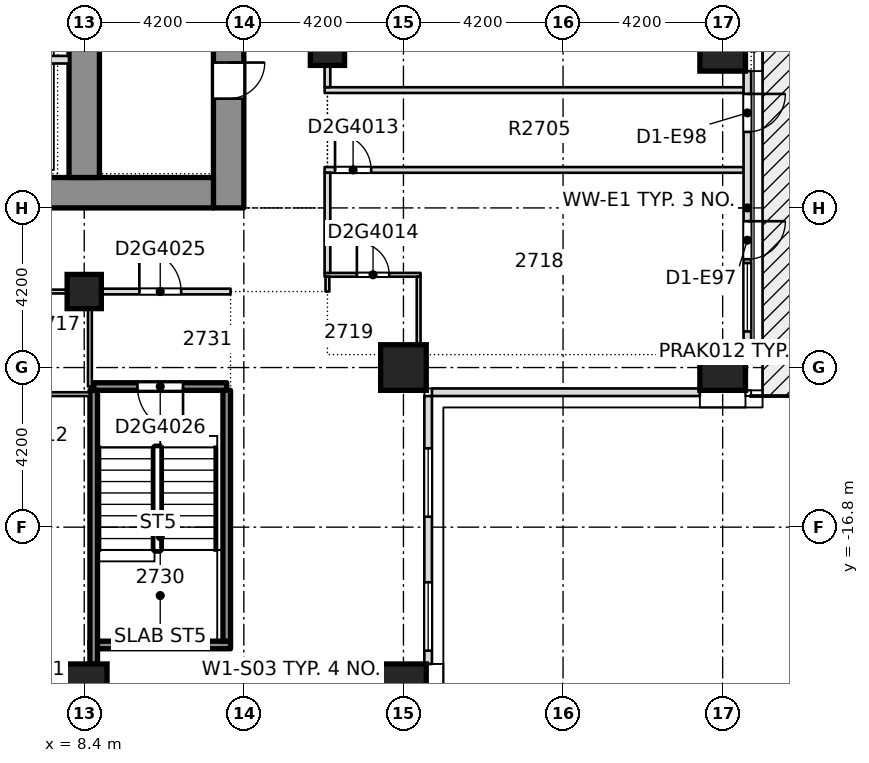
"""IFC4 building model, lengths in metres.
Left out: names, types, materials, properties, quantities, classifications, styles, units other than length and angle.
Written with IfcOpenShell. Run it as: python <this file> out.ifc"""

import sys

from ifc_helpers import new_model, si_unit, direction, frame, frame_2d, origin, origin_2d, place, context, subcontext, project, spatial, rectangle, extrude, element, fill, save


model = new_model("IFC4")
c1 = context("Model", 3, precision=1e-05, world=origin(), true_north=direction((0.0, 1.0)))
c2 = subcontext(c1, "Body", "Model", "MODEL_VIEW")
j1 = project(units=[si_unit("LENGTHUNIT", "METRE"), si_unit("PLANEANGLEUNIT", "RADIAN")], contexts=[c1])
p1 = place(None, origin())
s1 = spatial("IfcSite", under=j1, at=p1, CompositionType="ELEMENT")
p2 = place(p1, origin())
s2 = spatial("IfcBuilding", under=s1, at=p2, CompositionType="ELEMENT")
p3 = place(p2, frame((0.0, 0.0, 108.0)))
s3 = spatial("IfcBuildingStorey", under=s2, at=p3, CompositionType="ELEMENT", Elevation=108.0)
p4 = place(p3, frame((12.2, -8.4, -0.32), z_axis=(0.0, 0.0, 1.0), x_axis=(0.0, 1.0, 0.0)))
e1 = element("IfcWall", 1, at=p4, inside=s3, PredefinedType="SHEAR", context=c2, shape_type="SweptSolid", body=[
    extrude(rectangle(XDim=30.15, YDim=0.8, at=frame_2d((15.075, 0.0))), origin(), (0.0, 0.0, 1.0), 3.45),
])
p5 = place(p4, frame((2.875, 0.0, 0.32)))
e2 = element("IfcOpeningElement", 2, at=p5, cuts=e1, PredefinedType="OPENING", context=c2, shape_type="SweptSolid", body=[
    extrude(rectangle(XDim=0.95, YDim=2.1, at=frame_2d((0.475, 1.05))), frame((0.0, 0.41, 0.0), z_axis=(0.0, -1.0, 0.0), x_axis=(1.0, 0.0, 0.0)), (0.0, 0.0, 1.0), 0.82),
])
p6 = place(p4, frame((6.575, 0.0, 0.32)))
e3 = element("IfcOpeningElement", 3, at=p6, cuts=e1, PredefinedType="OPENING", context=c2, shape_type="SweptSolid", body=[
    extrude(rectangle(XDim=0.95, YDim=2.1, at=frame_2d((0.475, 1.05))), frame((0.0, 0.41, 0.0), z_axis=(0.0, -1.0, 0.0), x_axis=(1.0, 0.0, 0.0)), (0.0, 0.0, 1.0), 0.82),
])
p7 = place(p4, frame((9.425, 0.0, 0.32)))
e4 = element("IfcOpeningElement", 4, at=p7, cuts=e1, PredefinedType="OPENING", context=c2, shape_type="SweptSolid", body=[
    extrude(rectangle(XDim=0.95, YDim=2.1, at=frame_2d((0.475, 1.05))), frame((0.0, 0.41, 0.0), z_axis=(0.0, -1.0, 0.0), x_axis=(1.0, 0.0, 0.0)), (0.0, 0.0, 1.0), 0.82),
])
p8 = place(p4, frame((13.225, 0.0, 0.32)))
e5 = element("IfcOpeningElement", 5, at=p8, cuts=e1, PredefinedType="OPENING", context=c2, shape_type="SweptSolid", body=[
    extrude(rectangle(XDim=0.95, YDim=2.1, at=frame_2d((0.475, 1.05))), frame((0.0, 0.41, 0.0), z_axis=(0.0, -1.0, 0.0), x_axis=(1.0, 0.0, 0.0)), (0.0, 0.0, 1.0), 0.82),
])
p9 = place(p4, frame((16.775, 0.0, 0.32)))
e6 = element("IfcOpeningElement", 6, at=p9, cuts=e1, PredefinedType="OPENING", context=c2, shape_type="SweptSolid", body=[
    extrude(rectangle(XDim=0.95, YDim=2.1, at=frame_2d((0.475, 1.05))), frame((0.0, 0.41, 0.0), z_axis=(0.0, -1.0, 0.0), x_axis=(1.0, 0.0, 0.0)), (0.0, 0.0, 1.0), 0.82),
])
p10 = place(p4, frame((24.75, 0.0, 0.32)))
e7 = element("IfcOpeningElement", 7, at=p10, cuts=e1, PredefinedType="OPENING", context=c2, shape_type="SweptSolid", body=[
    extrude(rectangle(XDim=0.95, YDim=2.1, at=frame_2d((0.475, 1.05))), frame((0.0, 0.41, 0.0), z_axis=(0.0, -1.0, 0.0), x_axis=(1.0, 0.0, 0.0)), (0.0, 0.0, 1.0), 0.82),
])
p11 = place(p4, frame((19.3, 0.0, 0.32)))
e8 = element("IfcOpeningElement", 8, at=p11, cuts=e1, PredefinedType="OPENING", context=c2, shape_type="SweptSolid", body=[
    extrude(rectangle(XDim=1.2, YDim=2.1, at=frame_2d((0.6, 1.05))), frame((0.0, 0.41, 0.0), z_axis=(0.0, -1.0, 0.0), x_axis=(1.0, 0.0, 0.0)), (0.0, 0.0, 1.0), 0.82),
])
p12 = place(p3, frame((-11.8, -8.0, -0.32), z_axis=(0.0, 0.0, 1.0), x_axis=(1.0, 0.0, 0.0)))
e9 = element("IfcWall", 9, at=p12, inside=s3, PredefinedType="SHEAR", context=c2, shape_type="SweptSolid", body=[
    extrude(rectangle(XDim=23.6, YDim=0.8, at=frame_2d((11.8, 0.0))), origin(), (0.0, 0.0, 1.0), 3.45),
])
p13 = place(p12, frame((7.05, 0.0, 0.32)))
e10 = element("IfcOpeningElement", 10, at=p13, cuts=e9, PredefinedType="OPENING", context=c2, shape_type="SweptSolid", body=[
    extrude(rectangle(XDim=1.8, YDim=2.1, at=frame_2d((0.9, 1.05))), frame((0.0, 0.41, 0.0), z_axis=(0.0, -1.0, 0.0), x_axis=(1.0, 0.0, 0.0)), (0.0, 0.0, 1.0), 0.82),
])
p14 = place(p12, frame((14.75, 0.0, 0.32)))
e11 = element("IfcOpeningElement", 11, at=p14, cuts=e9, PredefinedType="OPENING", context=c2, shape_type="SweptSolid", body=[
    extrude(rectangle(XDim=1.8, YDim=2.1, at=frame_2d((0.9, 1.05))), frame((0.0, 0.41, 0.0), z_axis=(0.0, -1.0, 0.0), x_axis=(1.0, 0.0, 0.0)), (0.0, 0.0, 1.0), 0.82),
])
p15 = place(p3, frame((8.4, -7.6, -0.32), z_axis=(0.0, 0.0, 1.0), x_axis=(0.0, 1.0, 0.0)))
e12 = element("IfcWall", 12, at=p15, inside=s3, PredefinedType="SHEAR", context=c2, shape_type="SweptSolid", body=[
    extrude(rectangle(XDim=28.55, YDim=0.8, at=frame_2d((14.275, 0.0))), origin(), (0.0, 0.0, 1.0), 3.45),
])
p16 = place(p15, frame((18.5, 0.0, 0.32)))
e13 = element("IfcOpeningElement", 13, at=p16, cuts=e12, PredefinedType="OPENING", context=c2, shape_type="SweptSolid", body=[
    extrude(rectangle(XDim=1.2, YDim=2.1, at=frame_2d((0.6, 1.05))), frame((0.0, 0.41, 0.0), z_axis=(0.0, -1.0, 0.0), x_axis=(1.0, 0.0, 0.0)), (0.0, 0.0, 1.0), 0.82),
])
for number, where, z_axis, x_axis in (
    (14, (8.4, -21.0, -0.32), (0.0, 0.0, 1.0), (1.0, 0.0, 0.0)),
    (15, (16.8, -21.0, -0.32), (0.0, 0.0, 1.0), (1.0, 0.0, 0.0)),
    (16, (16.8, -12.6, -0.32), (0.0, 0.0, 1.0), (1.0, 0.0, 0.0)),
    (17, (25.2, -12.6, -0.32), (0.0, 0.0, 1.0), (1.0, 0.0, 0.0)),
    (18, (25.2, -4.2, -0.32), (0.0, 0.0, 1.0), (1.0, 0.0, 0.0)),
):
    element("IfcColumn", number, at=place(p3, frame(where, z_axis=z_axis, x_axis=x_axis)), inside=s3, PredefinedType="COLUMN", context=c2, shape_type="SweptSolid", body=[
        extrude(rectangle(XDim=1.2, YDim=1.2, at=origin_2d()), origin(), (0.0, 0.0, 1.0), 3.45),
    ])
for number, where, z_axis, x_axis in (
    (19, (8.4, -10.6, -0.32), (0.0, 0.0, 1.0), (1.0, 0.0, 0.0)),
    (20, (14.8, -4.2, -0.32), (0.0, 0.0, 1.0), (1.0, 0.0, 0.0)),
):
    element("IfcColumn", number, at=place(p3, frame(where, z_axis=z_axis, x_axis=x_axis)), inside=s3, PredefinedType="COLUMN", context=c2, shape_type="SweptSolid", body=[
        extrude(rectangle(XDim=0.9, YDim=0.9, at=origin_2d()), origin(), (0.0, 0.0, 1.0), 3.45),
    ])
p17 = place(p3, frame((6.1, -13.3, 0.0), z_axis=(0.0, 0.0, 1.0), x_axis=(1.0, 0.0, 0.0)))
e21 = element("IfcWall", 21, at=p17, inside=s3, PredefinedType="PARTITIONING", context=c2, shape_type="SweptSolid", body=[
    extrude(rectangle(XDim=2.45, YDim=0.1, at=frame_2d((1.225, 0.0))), origin(), (0.0, 0.0, 1.0), 3.13),
])
p18 = place(p17, frame((0.25, 0.0, 0.0)))
e22 = element("IfcOpeningElement", 22, at=p18, cuts=e21, PredefinedType="OPENING", context=c2, shape_type="SweptSolid", body=[
    extrude(rectangle(XDim=0.85, YDim=2.1, at=frame_2d((0.425, 1.05))), frame((0.0, 0.06, 0.0), z_axis=(0.0, -1.0, 0.0), x_axis=(1.0, 0.0, 0.0)), (0.0, 0.0, 1.0), 0.12),
])
p19 = place(p3, frame((8.65, -13.1, 0.0), z_axis=(0.0, 0.0, 1.0), x_axis=(1.0, 0.0, 0.0)))
e23 = element("IfcWall", 23, at=p19, inside=s3, PredefinedType="SOLIDWALL", context=c2, shape_type="SweptSolid", body=[
    extrude(rectangle(XDim=3.5, YDim=0.2, at=frame_2d((1.75, 0.0))), origin(), (0.0, 0.0, 1.0), 3.13),
])
p20 = place(p19, frame((1.15, 0.0, 0.0)))
e24 = element("IfcOpeningElement", 24, at=p20, cuts=e23, PredefinedType="OPENING", context=c2, shape_type="SweptSolid", body=[
    extrude(rectangle(XDim=1.2, YDim=2.1, at=frame_2d((0.6, 1.05))), frame((0.0, 0.11, 0.0), z_axis=(0.0, -1.0, 0.0), x_axis=(1.0, 0.0, 0.0)), (0.0, 0.0, 1.0), 0.22),
])
p21 = place(p3, frame((6.1, -10.6, 0.0), z_axis=(0.0, 0.0, 1.0), x_axis=(1.0, 0.0, 0.0)))
e25 = element("IfcWall", 25, at=p21, inside=s3, PredefinedType="PARTITIONING", context=c2, shape_type="SweptSolid", body=[
    extrude(rectangle(XDim=2.5, YDim=0.1, at=frame_2d((1.25, 0.0))), origin(), (0.0, 0.0, 1.0), 3.13),
])
p22 = place(p3, frame((8.5, -10.6, 0.0), z_axis=(0.0, 0.0, 1.0), x_axis=(1.0, 0.0, 0.0)))
e26 = element("IfcWall", 26, at=p22, inside=s3, PredefinedType="PARTITIONING", context=c2, shape_type="SweptSolid", body=[
    extrude(rectangle(XDim=3.75, YDim=0.15, at=frame_2d((1.875, 0.0))), origin(), (0.0, 0.0, 1.0), 3.13),
])
p23 = place(p22, frame((1.35, 0.0, 0.0)))
e27 = element("IfcOpeningElement", 27, at=p23, cuts=e26, PredefinedType="OPENING", context=c2, shape_type="SweptSolid", body=[
    extrude(rectangle(XDim=1.1, YDim=2.1, at=frame_2d((0.55, 1.05))), frame((0.0, 0.085, 0.0), z_axis=(0.0, -1.0, 0.0), x_axis=(1.0, 0.0, 0.0)), (0.0, 0.0, 1.0), 0.17),
])
p24 = place(p3, frame((14.725, -10.16, 0.0), z_axis=(0.0, 0.0, 1.0), x_axis=(1.0, 0.0, 0.0)))
e28 = element("IfcWall", 28, at=p24, inside=s3, PredefinedType="PARTITIONING", context=c2, shape_type="SweptSolid", body=[
    extrude(rectangle(XDim=2.525, YDim=0.1, at=frame_2d((1.262, 0.0))), origin(), (0.0, 0.0, 1.0), 3.13),
])
p25 = place(p24, frame((0.85, 0.0, 0.0)))
e29 = element("IfcOpeningElement", 29, at=p25, cuts=e28, PredefinedType="OPENING", context=c2, shape_type="SweptSolid", body=[
    extrude(rectangle(XDim=0.85, YDim=2.1, at=frame_2d((0.425, 1.05))), frame((0.0, 0.06, 0.0), z_axis=(0.0, -1.0, 0.0), x_axis=(1.0, 0.0, 0.0)), (0.0, 0.0, 1.0), 0.12),
])
p26 = place(p3, frame((14.725, -7.4, 0.0), z_axis=(0.0, 0.0, 1.0), x_axis=(1.0, 0.0, 0.0)))
e30 = element("IfcWall", 30, at=p26, inside=s3, PredefinedType="PARTITIONING", context=c2, shape_type="SweptSolid", body=[
    extrude(rectangle(XDim=11.025, YDim=0.15, at=frame_2d((5.512, 0.0))), origin(), (0.0, 0.0, 1.0), 3.13),
])
p27 = place(p26, frame((0.275, 0.0, 0.0)))
e31 = element("IfcOpeningElement", 31, at=p27, cuts=e30, PredefinedType="OPENING", context=c2, shape_type="SweptSolid", body=[
    extrude(rectangle(XDim=0.95, YDim=2.1, at=frame_2d((0.475, 1.05))), frame((0.0, 0.085, 0.0), z_axis=(0.0, -1.0, 0.0), x_axis=(1.0, 0.0, 0.0)), (0.0, 0.0, 1.0), 0.17),
])
p28 = place(p3, frame((14.727, -5.3, 0.0), z_axis=(0.0, 0.0, 1.0), x_axis=(1.0, 0.0, 0.0)))
e32 = element("IfcWall", 32, at=p28, inside=s3, PredefinedType="PARTITIONING", context=c2, shape_type="SweptSolid", body=[
    extrude(rectangle(XDim=11.023, YDim=0.15, at=frame_2d((5.511, 0.0))), origin(), (0.0, 0.0, 1.0), 3.13),
])
p29 = place(p3, frame((8.55, -13.1, 0.0), z_axis=(0.0, 0.0, 1.0), x_axis=(0.0, 1.0, 0.0)))
e33 = element("IfcWall", 33, at=p29, inside=s3, PredefinedType="PARTITIONING", context=c2, shape_type="SweptSolid", body=[
    extrude(rectangle(XDim=2.425, YDim=0.1, at=frame_2d((1.212, 0.0))), origin(), (0.0, 0.0, 1.0), 3.13),
])
p30 = place(p3, frame((14.8, -10.6, 0.0), z_axis=(0.0, 0.0, 1.0), x_axis=(0.0, 1.0, 0.0)))
e34 = element("IfcWall", 34, at=p30, inside=s3, PredefinedType="PARTITIONING", context=c2, shape_type="SweptSolid", body=[
    extrude(rectangle(XDim=0.39, YDim=0.1, at=frame_2d((0.195, 0.0))), origin(), (0.0, 0.0, 1.0), 3.13),
])
p31 = place(p3, frame((14.8, -10.11, 0.0), z_axis=(0.0, 0.0, 1.0), x_axis=(0.0, 1.0, 0.0)))
e35 = element("IfcWall", 35, at=p31, inside=s3, PredefinedType="PARTITIONING", context=c2, shape_type="SweptSolid", body=[
    extrude(rectangle(XDim=2.635, YDim=0.15, at=frame_2d((1.317, 0.0))), origin(), (0.0, 0.0, 1.0), 3.13),
])
p32 = place(p3, frame((14.8, -5.223, 0.0), z_axis=(0.0, 0.0, 1.0), x_axis=(0.0, 1.0, 0.0)))
e36 = element("IfcWall", 36, at=p32, inside=s3, PredefinedType="PARTITIONING", context=c2, shape_type="SweptSolid", body=[
    extrude(rectangle(XDim=18.523, YDim=0.15, at=frame_2d((9.261, 0.0))), origin(), (0.0, 0.0, 1.0), 3.13),
])
p33 = place(p32, frame((13.098, 0.0, 0.0)))
e37 = element("IfcOpeningElement", 37, at=p33, cuts=e36, PredefinedType="OPENING", context=c2, shape_type="SweptSolid", body=[
    extrude(rectangle(XDim=1.0, YDim=2.1, at=frame_2d((0.5, 1.05))), frame((0.0, 0.085, 0.0), z_axis=(0.0, -1.0, 0.0), x_axis=(1.0, 0.0, 0.0)), (0.0, 0.0, 1.0), 0.17),
])
p34 = place(p32, frame((4.673, 0.0, 0.0)))
e38 = element("IfcOpeningElement", 38, at=p34, cuts=e36, PredefinedType="OPENING", context=c2, shape_type="SweptSolid", body=[
    extrude(rectangle(XDim=1.1, YDim=2.1, at=frame_2d((0.55, 1.05))), frame((0.0, 0.085, 0.0), z_axis=(0.0, -1.0, 0.0), x_axis=(1.0, 0.0, 0.0)), (0.0, 0.0, 1.0), 0.17),
])
p35 = place(p3, frame((17.2, -12.26, 0.0), z_axis=(0.0, 0.0, 1.0), x_axis=(0.0, 1.0, 0.0)))
e39 = element("IfcWall", 39, at=p35, inside=s3, PredefinedType="PARTITIONING", context=c2, shape_type="SweptSolid", body=[
    extrude(rectangle(XDim=2.05, YDim=0.1, at=frame_2d((1.025, 0.0))), origin(), (0.0, 0.0, 1.0), 3.13),
])
p36 = place(p3, frame((17.45, -20.4, 0.0), z_axis=(0.0, 0.0, 1.0), x_axis=(0.0, 1.0, 0.0)))
e40 = element("IfcWall", 40, at=p36, inside=s3, PredefinedType="STANDARD", context=c2, shape_type="SweptSolid", body=[
    extrude(rectangle(XDim=7.05, YDim=0.2, at=frame_2d((3.525, 0.0))), origin(), (0.0, 0.0, 1.0), 3.13),
])
p37 = place(p36, frame((0.35, 0.0, 0.2)))
e41 = element("IfcOpeningElement", 41, at=p37, cuts=e40, PredefinedType="OPENING", context=c2, shape_type="SweptSolid", body=[
    extrude(rectangle(XDim=1.8, YDim=2.65, at=frame_2d((0.9, 1.325))), frame((0.0, 0.11, 0.0), z_axis=(0.0, -1.0, 0.0), x_axis=(1.0, 0.0, 0.0)), (0.0, 0.0, 1.0), 0.22),
])
p38 = place(p36, frame((3.875, 0.0, 0.2)))
e42 = element("IfcOpeningElement", 42, at=p38, cuts=e40, PredefinedType="OPENING", context=c2, shape_type="SweptSolid", body=[
    extrude(rectangle(XDim=1.8, YDim=2.65, at=frame_2d((0.9, 1.325))), frame((0.0, 0.11, 0.0), z_axis=(0.0, -1.0, 0.0), x_axis=(1.0, 0.0, 0.0)), (0.0, 0.0, 1.0), 0.22),
])
p39 = place(p3, frame((17.55, -13.25, 0.0), z_axis=(0.0, 0.0, 1.0), x_axis=(1.0, 0.0, 0.0)))
e43 = element("IfcWall", 43, at=p39, inside=s3, PredefinedType="STANDARD", context=c2, shape_type="SweptSolid", body=[
    extrude(rectangle(XDim=7.05, YDim=0.2, at=frame_2d((3.525, 0.0))), origin(), (0.0, 0.0, 1.0), 3.13),
])
p40 = place(p3, frame((25.85, -12.0, 0.0), z_axis=(0.0, 0.0, 1.0), x_axis=(0.0, 1.0, 0.0)))
e44 = element("IfcWall", 44, at=p40, inside=s3, PredefinedType="STANDARD", context=c2, shape_type="SweptSolid", body=[
    extrude(rectangle(XDim=7.2, YDim=0.2, at=frame_2d((3.6, 0.0))), origin(), (0.0, 0.0, 1.0), 3.13),
])
p41 = place(p40, frame((0.35, 0.0, 0.2)))
e45 = element("IfcOpeningElement", 45, at=p41, cuts=e44, PredefinedType="OPENING", context=c2, shape_type="SweptSolid", body=[
    extrude(rectangle(XDim=1.8, YDim=2.65, at=frame_2d((0.9, 1.325))), frame((0.0, 0.11, 0.0), z_axis=(0.0, -1.0, 0.0), x_axis=(1.0, 0.0, 0.0)), (0.0, 0.0, 1.0), 0.22),
])
p42 = place(p40, frame((2.25, 0.0, 0.0)))
e46 = element("IfcOpeningElement", 46, at=p42, cuts=e44, PredefinedType="OPENING", context=c2, shape_type="SweptSolid", body=[
    extrude(rectangle(XDim=1.0, YDim=2.4, at=frame_2d((0.5, 1.2))), frame((0.0, 0.11, 0.0), z_axis=(0.0, -1.0, 0.0), x_axis=(1.0, 0.0, 0.0)), (0.0, 0.0, 1.0), 0.22),
])
p43 = place(p40, frame((5.6, 0.0, 0.0)))
e47 = element("IfcOpeningElement", 47, at=p43, cuts=e44, PredefinedType="OPENING", context=c2, shape_type="SweptSolid", body=[
    extrude(rectangle(XDim=1.0, YDim=2.4, at=frame_2d((0.5, 1.2))), frame((0.0, 0.11, 0.0), z_axis=(0.0, -1.0, 0.0), x_axis=(1.0, 0.0, 0.0)), (0.0, 0.0, 1.0), 0.22),
])
p44 = place(p3, frame((5.575, -4.5, 0.0), z_axis=(0.0, 0.0, 1.0), x_axis=(1.0, 0.0, 0.0)))
e48 = element("IfcWall", 48, at=p44, inside=s3, PredefinedType="PARTITIONING", context=c2, shape_type="SweptSolid", body=[
    extrude(rectangle(XDim=2.424, YDim=0.2, at=frame_2d((1.212, 0.0))), origin(), (0.0, 0.0, 1.0), 3.13),
])
p45 = place(p3, frame((8.55, -19.9, 0.0), z_axis=(0.0, 0.0, 1.0), x_axis=(1.0, 0.0, 0.0)))
e49 = element("IfcWall", 49, at=p45, inside=s3, PredefinedType="SOLIDWALL", context=c2, shape_type="SweptSolid", body=[
    extrude(rectangle(XDim=3.7, YDim=0.2, at=frame_2d((1.85, 0.0))), origin(), (0.0, 0.0, 1.0), 3.13),
])
p46 = place(p3, frame((12.15, -19.8, 0.0), z_axis=(0.0, 0.0, 1.0), x_axis=(0.0, 1.0, 0.0)))
e50 = element("IfcWall", 50, at=p46, inside=s3, PredefinedType="SOLIDWALL", context=c2, shape_type="SweptSolid", body=[
    extrude(rectangle(XDim=6.6, YDim=0.2, at=frame_2d((3.3, 0.0))), origin(), (0.0, 0.0, 1.0), 3.13),
])
p47 = place(p3, frame((8.65, -20.4, 0.0), z_axis=(0.0, 0.0, 1.0), x_axis=(0.0, 1.0, 0.0)))
e51 = element("IfcWall", 51, at=p47, inside=s3, PredefinedType="SOLIDWALL", context=c2, shape_type="SweptSolid", body=[
    extrude(rectangle(XDim=7.198, YDim=0.2, at=frame_2d((3.599, 0.0))), origin(), (0.0, 0.0, 1.0), 3.13),
])
p48 = place(p27, origin())
e52 = element("IfcDoor", 52, at=p48, inside=s3, OperationType="SINGLE_SWING_RIGHT", PredefinedType="DOOR", context=c2, shape_type="SweptSolid", body=[
    extrude(rectangle(XDim=0.95, YDim=2.1, at=frame_2d((0.475, 1.05))), frame((0.0, 0.025, 0.0), z_axis=(0.0, -1.0, 0.0), x_axis=(1.0, 0.0, 0.0)), (0.0, 0.0, 1.0), 0.05),
])
fill(e31, e52)
p49 = place(p25, origin())
e53 = element("IfcDoor", 53, at=p49, inside=s3, OperationType="SINGLE_SWING_RIGHT", PredefinedType="DOOR", context=c2, shape_type="SweptSolid", body=[
    extrude(rectangle(XDim=0.85, YDim=2.1, at=frame_2d((0.425, 1.05))), frame((0.0, 0.025, 0.0), z_axis=(0.0, -1.0, 0.0), x_axis=(1.0, 0.0, 0.0)), (0.0, 0.0, 1.0), 0.05),
])
fill(e29, e53)
p50 = place(p23, origin())
e54 = element("IfcDoor", 54, at=p50, inside=s3, OperationType="SINGLE_SWING_RIGHT", PredefinedType="DOOR", context=c2, shape_type="SweptSolid", body=[
    extrude(rectangle(XDim=1.1, YDim=2.1, at=frame_2d((0.55, 1.05))), frame((0.0, 0.025, 0.0), z_axis=(0.0, -1.0, 0.0), x_axis=(1.0, 0.0, 0.0)), (0.0, 0.0, 1.0), 0.05),
])
fill(e27, e54)
p51 = place(p20, origin())
e55 = element("IfcDoor", 55, at=p51, inside=s3, OperationType="SINGLE_SWING_RIGHT", PredefinedType="DOOR", context=c2, shape_type="SweptSolid", body=[
    extrude(rectangle(XDim=1.2, YDim=2.1, at=frame_2d((0.6, 1.05))), frame((0.0, 0.025, 0.0), z_axis=(0.0, -1.0, 0.0), x_axis=(1.0, 0.0, 0.0)), (0.0, 0.0, 1.0), 0.05),
])
fill(e24, e55)
p52 = place(p37, origin())
e56 = element("IfcWindow", 56, at=p52, inside=s3, PartitioningType="SINGLE_PANEL", PredefinedType="WINDOW", context=c2, shape_type="SweptSolid", body=[
    extrude(rectangle(XDim=1.8, YDim=2.65, at=frame_2d((0.9, 1.325))), frame((0.0, 0.03, 0.0), z_axis=(0.0, -1.0, 0.0), x_axis=(1.0, 0.0, 0.0)), (0.0, 0.0, 1.0), 0.06),
])
fill(e41, e56)
p53 = place(p38, origin())
e57 = element("IfcWindow", 57, at=p53, inside=s3, PartitioningType="SINGLE_PANEL", PredefinedType="WINDOW", context=c2, shape_type="SweptSolid", body=[
    extrude(rectangle(XDim=1.8, YDim=2.65, at=frame_2d((0.9, 1.325))), frame((0.0, 0.03, 0.0), z_axis=(0.0, -1.0, 0.0), x_axis=(1.0, 0.0, 0.0)), (0.0, 0.0, 1.0), 0.06),
])
fill(e42, e57)
p54 = place(p41, origin())
e58 = element("IfcWindow", 58, at=p54, inside=s3, PartitioningType="SINGLE_PANEL", PredefinedType="WINDOW", context=c2, shape_type="SweptSolid", body=[
    extrude(rectangle(XDim=1.8, YDim=2.65, at=frame_2d((0.9, 1.325))), frame((0.0, 0.03, 0.0), z_axis=(0.0, -1.0, 0.0), x_axis=(1.0, 0.0, 0.0)), (0.0, 0.0, 1.0), 0.06),
])
fill(e45, e58)
p55 = place(p42, origin())
e59 = element("IfcDoor", 59, at=p55, inside=s3, OperationType="SINGLE_SWING_LEFT", PredefinedType="DOOR", context=c2, shape_type="SweptSolid", body=[
    extrude(rectangle(XDim=1.0, YDim=2.4, at=frame_2d((0.5, 1.2))), frame((0.0, 0.025, 0.0), z_axis=(0.0, -1.0, 0.0), x_axis=(1.0, 0.0, 0.0)), (0.0, 0.0, 1.0), 0.05),
])
fill(e46, e59)
p56 = place(p43, origin())
e60 = element("IfcDoor", 60, at=p56, inside=s3, OperationType="SINGLE_SWING_LEFT", PredefinedType="DOOR", context=c2, shape_type="SweptSolid", body=[
    extrude(rectangle(XDim=1.0, YDim=2.4, at=frame_2d((0.5, 1.2))), frame((0.0, 0.025, 0.0), z_axis=(0.0, -1.0, 0.0), x_axis=(1.0, 0.0, 0.0)), (0.0, 0.0, 1.0), 0.05),
])
fill(e47, e60)
p57 = place(p5, origin())
e61 = element("IfcDoor", 61, at=p57, inside=s3, OperationType="SINGLE_SWING_LEFT", PredefinedType="DOOR", context=c2, shape_type="SweptSolid", body=[
    extrude(rectangle(XDim=0.95, YDim=2.1, at=frame_2d((0.475, 1.05))), frame((0.0, 0.025, 0.0), z_axis=(0.0, -1.0, 0.0), x_axis=(1.0, 0.0, 0.0)), (0.0, 0.0, 1.0), 0.05),
])
fill(e2, e61)
save(model, sys.argv[1])
